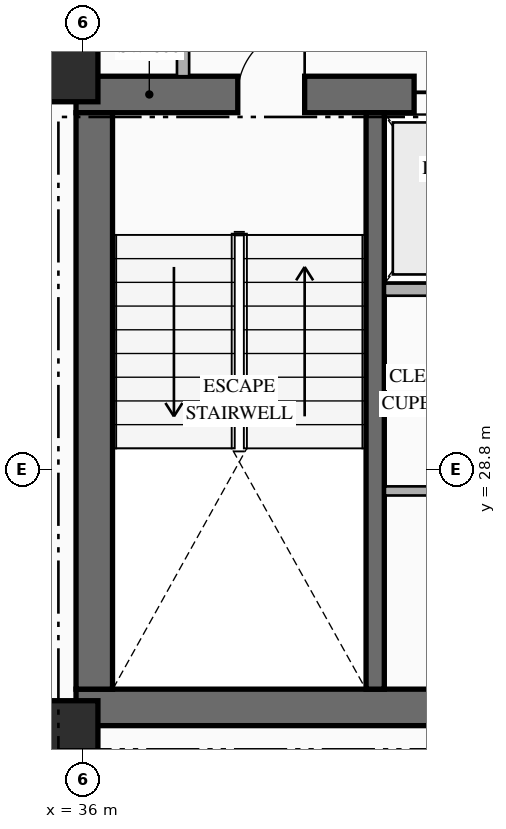
"""IFC4 building model, lengths in metres.
Left out: names, types, materials, properties, quantities, classifications, styles, units other than length and angle.
Written with IfcOpenShell. Run it as: python <this file> out.ifc"""

import sys

from ifc_helpers import new_model, si_unit, direction, frame, frame_2d, origin, origin_2d, place, context, subcontext, project, spatial, rectangle, extrude, element, fill, save


model = new_model("IFC4")
c1 = context("Model", 3, precision=1e-05, world=origin(), true_north=direction((0.0, 1.0)))
c2 = subcontext(c1, "Body", "Model", "MODEL_VIEW")
j1 = project(units=[si_unit("LENGTHUNIT", "METRE"), si_unit("PLANEANGLEUNIT", "RADIAN")], contexts=[c1])
p1 = place(None, origin())
s1 = spatial("IfcSite", under=j1, at=p1, CompositionType="ELEMENT")
p2 = place(p1, origin())
s2 = spatial("IfcBuilding", under=s1, at=p2, CompositionType="ELEMENT")
p3 = place(p2, frame((0.0, 0.0, 167.25)))
s3 = spatial("IfcBuildingStorey", under=s2, at=p3, CompositionType="ELEMENT", Elevation=167.25)
p4 = place(p3, frame((35.89, 24.89, 0.0), z_axis=(0.0, 0.0, 1.0), x_axis=(1.0, 0.0, 0.0)))
e1 = element("IfcWall", 1, at=p4, inside=s3, PredefinedType="SHEAR", context=c2, shape_type="SweptSolid", body=[
    extrude(rectangle(XDim=7.76, YDim=0.6, at=frame_2d((3.88, 0.0))), origin(), (0.0, 0.0, 1.0), 3.6),
])
p5 = place(p3, frame((35.89, 34.97, 0.0), z_axis=(0.0, 0.0, 1.0), x_axis=(1.0, 0.0, 0.0)))
e2 = element("IfcWall", 2, at=p5, inside=s3, PredefinedType="SHEAR", context=c2, shape_type="SweptSolid", body=[
    extrude(rectangle(XDim=7.76, YDim=0.6, at=frame_2d((3.88, 0.0))), origin(), (0.0, 0.0, 1.0), 3.6),
])
p6 = place(p5, frame((2.66, 0.0, 0.0)))
e3 = element("IfcOpeningElement", 3, at=p6, cuts=e2, PredefinedType="OPENING", context=c2, shape_type="SweptSolid", body=[
    extrude(rectangle(XDim=1.1, YDim=2.2, at=frame_2d((0.55, 1.1))), frame((0.0, 0.31, 0.0), z_axis=(0.0, -1.0, 0.0), x_axis=(1.0, 0.0, 0.0)), (0.0, 0.0, 1.0), 0.62),
])
p7 = place(p5, frame((5.56, 0.0, 0.0)))
e4 = element("IfcOpeningElement", 4, at=p7, cuts=e2, PredefinedType="OPENING", context=c2, shape_type="SweptSolid", body=[
    extrude(rectangle(XDim=1.12, YDim=2.15, at=frame_2d((0.56, 1.075))), frame((0.0, 0.31, 0.0), z_axis=(0.0, -1.0, 0.0), x_axis=(1.0, 0.0, 0.0)), (0.0, 0.0, 1.0), 0.62),
])
p8 = place(p3, frame((36.19, 25.19, 0.0), z_axis=(0.0, 0.0, 1.0), x_axis=(0.0, 1.0, 0.0)))
e5 = element("IfcWall", 5, at=p8, inside=s3, PredefinedType="SHEAR", context=c2, shape_type="SweptSolid", body=[
    extrude(rectangle(XDim=9.48, YDim=0.6, at=frame_2d((4.74, 0.0))), origin(), (0.0, 0.0, 1.0), 3.6),
])
p9 = place(p3, frame((40.81, 25.19, 0.0), z_axis=(0.0, 0.0, 1.0), x_axis=(0.0, 1.0, 0.0)))
e6 = element("IfcWall", 6, at=p9, inside=s3, PredefinedType="SHEAR", context=c2, shape_type="SweptSolid", body=[
    extrude(rectangle(XDim=9.48, YDim=0.3, at=frame_2d((4.74, 0.0))), origin(), (0.0, 0.0, 1.0), 3.6),
])
for number, where, z_axis, x_axis in (
    (7, (35.8, 24.55, 0.0), (0.0, 0.0, 1.0), (1.0, 0.0, 0.0)),
    (8, (35.8, 35.3, 0.0), (0.0, 0.0, 1.0), (1.0, 0.0, 0.0)),
):
    element("IfcColumn", number, at=place(p3, frame(where, z_axis=z_axis, x_axis=x_axis)), inside=s3, PredefinedType="COLUMN", context=c2, shape_type="SweptSolid", body=[
        extrude(rectangle(XDim=0.9, YDim=0.9, at=origin_2d()), origin(), (0.0, 0.0, 1.0), 3.6),
    ])
p10 = place(p3, frame((40.97, 31.76, 0.0), z_axis=(0.0, 0.0, 1.0), x_axis=(1.0, 0.0, 0.0)))
e9 = element("IfcWall", 9, at=p10, inside=s3, PredefinedType="STANDARD", context=c2, shape_type="SweptSolid", body=[
    extrude(rectangle(XDim=2.08, YDim=0.2, at=frame_2d((1.04, 0.0))), origin(), (0.0, 0.0, 1.0), 3.35),
])
p11 = place(p3, frame((40.97, 28.45, 0.0), z_axis=(0.0, 0.0, 1.0), x_axis=(1.0, 0.0, 0.0)))
e10 = element("IfcWall", 10, at=p11, inside=s3, PredefinedType="PARTITIONING", context=c2, shape_type="SweptSolid", body=[
    extrude(rectangle(XDim=2.08, YDim=0.15, at=frame_2d((1.04, 0.0))), origin(), (0.0, 0.0, 1.0), 3.35),
])
p12 = place(p3, frame((37.65, 35.27, 0.0), z_axis=(0.0, 0.0, 1.0), x_axis=(0.0, 1.0, 0.0)))
e11 = element("IfcWall", 11, at=p12, inside=s3, PredefinedType="STANDARD", context=c2, shape_type="SweptSolid", body=[
    extrude(rectangle(XDim=2.83, YDim=0.2, at=frame_2d((1.415, 0.0))), origin(), (0.0, 0.0, 1.0), 3.35),
])
p13 = place(p12, frame((0.915, 0.0, 0.0)))
e12 = element("IfcOpeningElement", 12, at=p13, cuts=e11, PredefinedType="OPENING", context=c2, shape_type="SweptSolid", body=[
    extrude(rectangle(XDim=1.0, YDim=2.2, at=frame_2d((0.5, 1.1))), frame((0.0, 0.11, 0.0), z_axis=(0.0, -1.0, 0.0), x_axis=(1.0, 0.0, 0.0)), (0.0, 0.0, 1.0), 0.22),
])
p14 = place(p3, frame((27.91, 26.68, 0.0), z_axis=(0.0, 0.0, 1.0), x_axis=(0.800005938517, -0.599992081896, 0.0)))
e13 = element("IfcWall", 13, at=p14, inside=s3, PredefinedType="PARTITIONING", context=c2, shape_type="SweptSolid", body=[
    extrude(rectangle(XDim=14.8, YDim=0.15, at=frame_2d((7.4, 0.0))), origin(), (0.0, 0.0, 1.0), 3.35),
])
p15 = place(p14, frame((9.281, 0.0, 0.0)))
e14 = element("IfcOpeningElement", 14, at=p15, cuts=e13, PredefinedType="OPENING", context=c2, shape_type="SweptSolid", body=[
    extrude(rectangle(XDim=0.95, YDim=2.15, at=frame_2d((0.475, 1.075))), frame((0.0, 0.085, 0.0), z_axis=(0.0, -1.0, 0.0), x_axis=(1.0, 0.0, 0.0)), (0.0, 0.0, 1.0), 0.17),
])
p16 = place(p6, origin())
e15 = element("IfcDoor", 15, at=p16, inside=s3, OperationType="SINGLE_SWING_RIGHT", PredefinedType="DOOR", context=c2, shape_type="SweptSolid", body=[
    extrude(rectangle(XDim=1.1, YDim=2.2, at=frame_2d((0.55, 1.1))), frame((0.0, 0.025, 0.0), z_axis=(0.0, -1.0, 0.0), x_axis=(1.0, 0.0, 0.0)), (0.0, 0.0, 1.0), 0.05),
])
fill(e3, e15)
p17 = place(p7, origin())
e16 = element("IfcDoor", 16, at=p17, inside=s3, OperationType="SLIDING_TO_RIGHT", PredefinedType="USERDEFINED", context=c2, shape_type="SweptSolid", body=[
    extrude(rectangle(XDim=1.12, YDim=2.15, at=frame_2d((0.56, 1.075))), frame((0.0, 0.025, 0.0), z_axis=(0.0, -1.0, 0.0), x_axis=(1.0, 0.0, 0.0)), (0.0, 0.0, 1.0), 0.05),
])
fill(e4, e16)
save(model, sys.argv[1])
